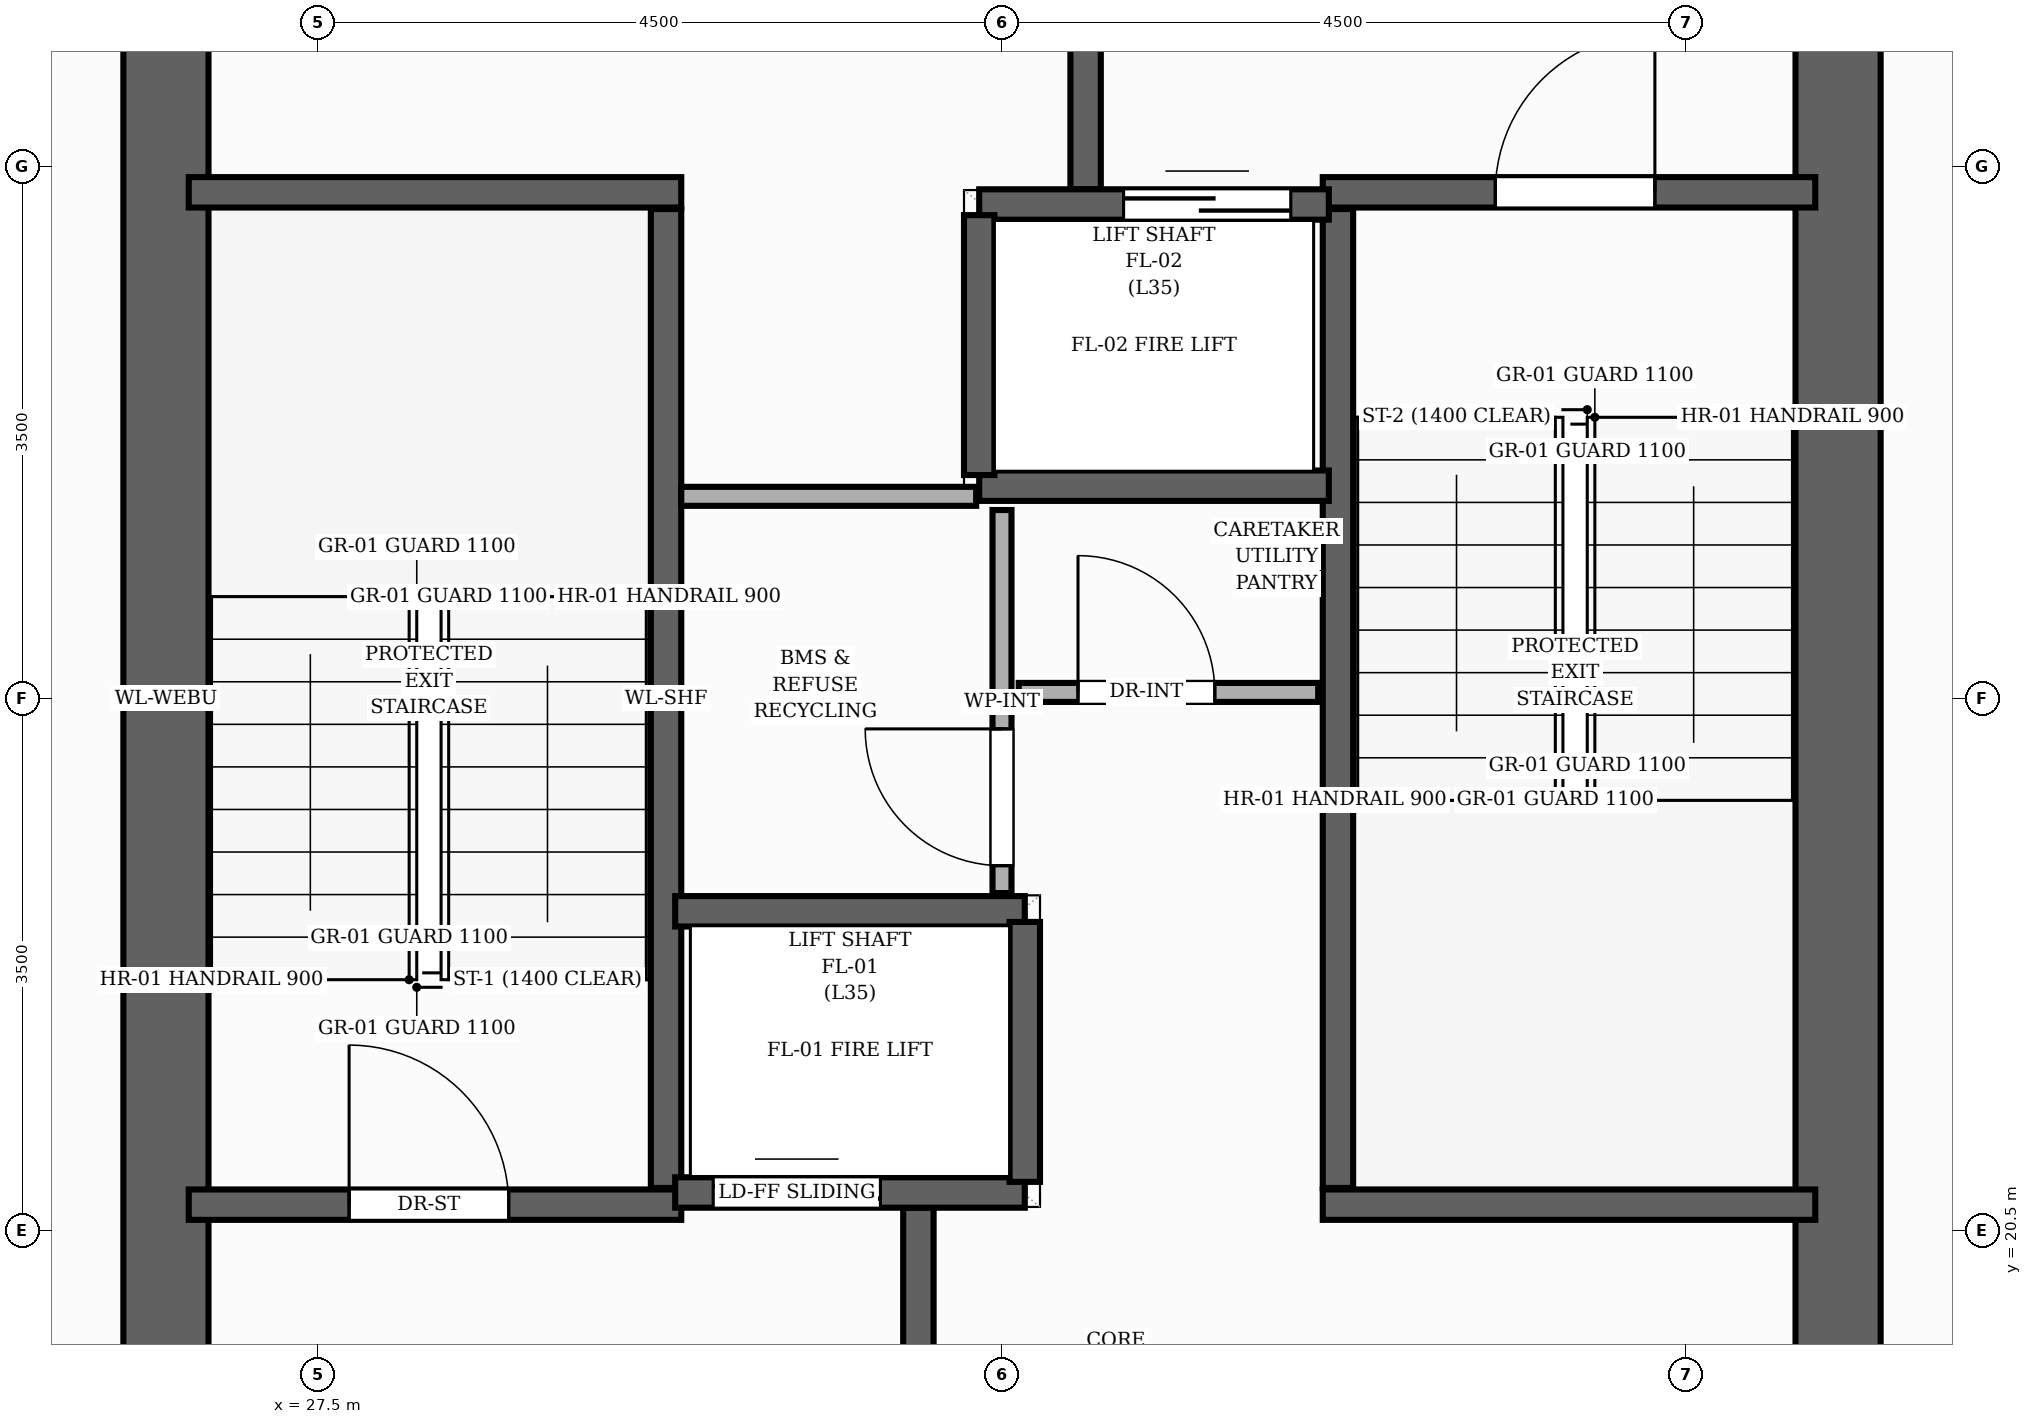
"""IFC4 building model, lengths in metres.
Left out: names, types, materials, properties, quantities, classifications, styles, units other than length and angle.
Written with IfcOpenShell. Run it as: python <this file> out.ifc"""

import sys

from ifc_helpers import new_model, si_unit, direction, frame, frame_2d, origin, place, context, subcontext, project, spatial, rectangle, extrude, element, fill, save


model = new_model("IFC4")
c1 = context("Model", 3, precision=1e-05, world=origin(), true_north=direction((0.0, 1.0)))
c2 = subcontext(c1, "Body", "Model", "MODEL_VIEW")
j1 = project(units=[si_unit("LENGTHUNIT", "METRE"), si_unit("PLANEANGLEUNIT", "RADIAN")], contexts=[c1])
p1 = place(None, origin())
s1 = spatial("IfcSite", under=j1, at=p1, CompositionType="ELEMENT")
p2 = place(p1, origin())
s2 = spatial("IfcBuilding", under=s1, at=p2, CompositionType="ELEMENT")
p3 = place(p2, frame((0.0, 0.0, 120.16)))
s3 = spatial("IfcBuildingStorey", under=s2, at=p3, CompositionType="ELEMENT", Elevation=120.16)
for number, where, z_axis, x_axis in (
    (1, (26.5, 17.3, 0.0), (0.0, 0.0, 1.0), (0.0, 1.0, 0.0)),
    (2, (37.5, 17.3, 0.0), (0.0, 0.0, 1.0), (0.0, 1.0, 0.0)),
):
    element("IfcWall", number, at=place(p3, frame(where, z_axis=z_axis, x_axis=x_axis)), inside=s3, PredefinedType="SHEAR", context=c2, shape_type="SweptSolid", body=[
        extrude(rectangle(XDim=13.4, YDim=0.56, at=frame_2d((6.7, 0.0))), origin(), (0.0, 0.0, 1.0), 3.2),
    ])
p4 = place(p3, frame((29.79, 20.78, 0.0), z_axis=(0.0, 0.0, 1.0), x_axis=(0.0, 1.0, 0.0)))
e3 = element("IfcWall", 3, at=p4, inside=s3, PredefinedType="SHEAR", context=c2, shape_type="SweptSolid", body=[
    extrude(rectangle(XDim=6.44, YDim=0.2, at=frame_2d((3.22, 0.0))), origin(), (0.0, 0.0, 1.0), 3.2),
])
p5 = place(p3, frame((26.65, 27.33, 0.0), z_axis=(0.0, 0.0, 1.0), x_axis=(1.0, 0.0, 0.0)))
e4 = element("IfcWall", 4, at=p5, inside=s3, PredefinedType="SHEAR", context=c2, shape_type="SweptSolid", body=[
    extrude(rectangle(XDim=3.24, YDim=0.2, at=frame_2d((1.62, 0.0))), origin(), (0.0, 0.0, 1.0), 3.2),
])
p6 = place(p3, frame((26.65, 20.67, 0.0), z_axis=(0.0, 0.0, 1.0), x_axis=(1.0, 0.0, 0.0)))
e5 = element("IfcWall", 5, at=p6, inside=s3, PredefinedType="SHEAR", context=c2, shape_type="SweptSolid", body=[
    extrude(rectangle(XDim=3.24, YDim=0.2, at=frame_2d((1.62, 0.0))), origin(), (0.0, 0.0, 1.0), 3.2),
])
p7 = place(p6, frame((1.055, 0.0, 0.0)))
e6 = element("IfcOpeningElement", 6, at=p7, cuts=e5, PredefinedType="OPENING", context=c2, shape_type="SweptSolid", body=[
    extrude(rectangle(XDim=1.05, YDim=2.15, at=frame_2d((0.525, 1.075))), frame((0.0, 0.11, 0.0), z_axis=(0.0, -1.0, 0.0), x_axis=(1.0, 0.0, 0.0)), (0.0, 0.0, 1.0), 0.22),
])
p8 = place(p3, frame((34.21, 20.78, 0.0), z_axis=(0.0, 0.0, 1.0), x_axis=(0.0, 1.0, 0.0)))
e7 = element("IfcWall", 7, at=p8, inside=s3, PredefinedType="SHEAR", context=c2, shape_type="SweptSolid", body=[
    extrude(rectangle(XDim=6.44, YDim=0.2, at=frame_2d((3.22, 0.0))), origin(), (0.0, 0.0, 1.0), 3.2),
])
p9 = place(p3, frame((34.11, 20.67, 0.0), z_axis=(0.0, 0.0, 1.0), x_axis=(1.0, 0.0, 0.0)))
e8 = element("IfcWall", 8, at=p9, inside=s3, PredefinedType="SHEAR", context=c2, shape_type="SweptSolid", body=[
    extrude(rectangle(XDim=3.24, YDim=0.2, at=frame_2d((1.62, 0.0))), origin(), (0.0, 0.0, 1.0), 3.2),
])
p10 = place(p3, frame((34.11, 27.33, 0.0), z_axis=(0.0, 0.0, 1.0), x_axis=(1.0, 0.0, 0.0)))
e9 = element("IfcWall", 9, at=p10, inside=s3, PredefinedType="SHEAR", context=c2, shape_type="SweptSolid", body=[
    extrude(rectangle(XDim=3.24, YDim=0.2, at=frame_2d((1.62, 0.0))), origin(), (0.0, 0.0, 1.0), 3.2),
])
p11 = place(p10, frame((1.135, 0.0, 0.0)))
e10 = element("IfcOpeningElement", 10, at=p11, cuts=e9, PredefinedType="OPENING", context=c2, shape_type="SweptSolid", body=[
    extrude(rectangle(XDim=1.05, YDim=2.15, at=frame_2d((0.525, 1.075))), frame((0.0, 0.11, 0.0), z_axis=(0.0, -1.0, 0.0), x_axis=(1.0, 0.0, 0.0)), (0.0, 0.0, 1.0), 0.22),
])
for number, where, z_axis, x_axis in (
    (11, (31.45, 17.15, 0.0), (0.0, 0.0, 1.0), (0.0, 1.0, 0.0)),
    (12, (32.55, 27.35, 0.0), (0.0, 0.0, 1.0), (0.0, 1.0, 0.0)),
):
    element("IfcWall", number, at=place(p3, frame(where, z_axis=z_axis, x_axis=x_axis)), inside=s3, PredefinedType="SHEAR", context=c2, shape_type="SweptSolid", body=[
        extrude(rectangle(XDim=3.5, YDim=0.2, at=frame_2d((1.75, 0.0))), origin(), (0.0, 0.0, 1.0), 3.2),
    ])
p12 = place(p3, frame((29.85, 20.75, 0.0), z_axis=(0.0, 0.0, 1.0), x_axis=(1.0, 0.0, 0.0)))
e13 = element("IfcWall", 13, at=p12, inside=s3, PredefinedType="SHEAR", context=c2, shape_type="SweptSolid", body=[
    extrude(rectangle(XDim=2.3, YDim=0.2, at=frame_2d((1.15, 0.0))), origin(), (0.0, 0.0, 1.0), 3.2),
])
p13 = place(p12, frame((0.25, 0.0, 0.0)))
e14 = element("IfcOpeningElement", 14, at=p13, cuts=e13, PredefinedType="OPENING", context=c2, shape_type="SweptSolid", body=[
    extrude(rectangle(XDim=1.1, YDim=2.15, at=frame_2d((0.55, 1.075))), frame((0.0, 0.11, 0.0), z_axis=(0.0, -1.0, 0.0), x_axis=(1.0, 0.0, 0.0)), (0.0, 0.0, 1.0), 0.22),
])
p14 = place(p3, frame((29.85, 22.6, 0.0), z_axis=(0.0, 0.0, 1.0), x_axis=(1.0, 0.0, 0.0)))
e15 = element("IfcWall", 15, at=p14, inside=s3, PredefinedType="SHEAR", context=c2, shape_type="SweptSolid", body=[
    extrude(rectangle(XDim=2.3, YDim=0.2, at=frame_2d((1.15, 0.0))), origin(), (0.0, 0.0, 1.0), 3.2),
])
p15 = place(p3, frame((32.15, 20.82, 0.0), z_axis=(0.0, 0.0, 1.0), x_axis=(0.0, 1.0, 0.0)))
e16 = element("IfcWall", 16, at=p15, inside=s3, PredefinedType="SHEAR", context=c2, shape_type="SweptSolid", body=[
    extrude(rectangle(XDim=1.71, YDim=0.2, at=frame_2d((0.855, 0.0))), origin(), (0.0, 0.0, 1.0), 3.2),
])
p16 = place(p3, frame((31.85, 27.25, 0.0), z_axis=(0.0, 0.0, 1.0), x_axis=(1.0, 0.0, 0.0)))
e17 = element("IfcWall", 17, at=p16, inside=s3, PredefinedType="SHEAR", context=c2, shape_type="SweptSolid", body=[
    extrude(rectangle(XDim=2.3, YDim=0.2, at=frame_2d((1.15, 0.0))), origin(), (0.0, 0.0, 1.0), 3.2),
])
p17 = place(p16, frame((0.95, 0.0, 0.0)))
e18 = element("IfcOpeningElement", 18, at=p17, cuts=e17, PredefinedType="OPENING", context=c2, shape_type="SweptSolid", body=[
    extrude(rectangle(XDim=1.1, YDim=2.15, at=frame_2d((0.55, 1.075))), frame((0.0, 0.11, 0.0), z_axis=(0.0, -1.0, 0.0), x_axis=(1.0, 0.0, 0.0)), (0.0, 0.0, 1.0), 0.22),
])
p18 = place(p3, frame((31.85, 25.4, 0.0), z_axis=(0.0, 0.0, 1.0), x_axis=(1.0, 0.0, 0.0)))
e19 = element("IfcWall", 19, at=p18, inside=s3, PredefinedType="SHEAR", context=c2, shape_type="SweptSolid", body=[
    extrude(rectangle(XDim=2.3, YDim=0.2, at=frame_2d((1.15, 0.0))), origin(), (0.0, 0.0, 1.0), 3.2),
])
p19 = place(p3, frame((31.85, 25.47, 0.0), z_axis=(0.0, 0.0, 1.0), x_axis=(0.0, 1.0, 0.0)))
e20 = element("IfcWall", 20, at=p19, inside=s3, PredefinedType="SHEAR", context=c2, shape_type="SweptSolid", body=[
    extrude(rectangle(XDim=1.71, YDim=0.2, at=frame_2d((0.855, 0.0))), origin(), (0.0, 0.0, 1.0), 3.2),
])
p20 = place(p3, frame((32.0, 22.72, 0.0), z_axis=(0.0, 0.0, 1.0), x_axis=(0.0, 1.0, 0.0)))
e21 = element("IfcWall", 21, at=p20, inside=s3, PredefinedType="PARTITIONING", context=c2, shape_type="SweptSolid", body=[
    extrude(rectangle(XDim=2.52, YDim=0.125, at=frame_2d((1.26, 0.0))), origin(), (0.0, 0.0, 1.0), 2.955),
])
p21 = place(p20, frame((0.18, 0.0, 0.0)))
e22 = element("IfcOpeningElement", 22, at=p21, cuts=e21, PredefinedType="OPENING", context=c2, shape_type="SweptSolid", body=[
    extrude(rectangle(XDim=0.9, YDim=2.1, at=frame_2d((0.45, 1.05))), frame((0.0, 0.073, 0.0), z_axis=(0.0, -1.0, 0.0), x_axis=(1.0, 0.0, 0.0)), (0.0, 0.0, 1.0), 0.145),
])
p22 = place(p3, frame((32.11, 24.04, 0.0), z_axis=(0.0, 0.0, 1.0), x_axis=(1.0, 0.0, 0.0)))
e23 = element("IfcWall", 23, at=p22, inside=s3, PredefinedType="PARTITIONING", context=c2, shape_type="SweptSolid", body=[
    extrude(rectangle(XDim=1.97, YDim=0.125, at=frame_2d((0.985, 0.0))), origin(), (0.0, 0.0, 1.0), 2.955),
])
p23 = place(p22, frame((0.39, 0.0, 0.0)))
e24 = element("IfcOpeningElement", 24, at=p23, cuts=e23, PredefinedType="OPENING", context=c2, shape_type="SweptSolid", body=[
    extrude(rectangle(XDim=0.9, YDim=2.1, at=frame_2d((0.45, 1.05))), frame((0.0, 0.073, 0.0), z_axis=(0.0, -1.0, 0.0), x_axis=(1.0, 0.0, 0.0)), (0.0, 0.0, 1.0), 0.145),
])
p24 = place(p3, frame((29.89, 25.33, 0.0), z_axis=(0.0, 0.0, 1.0), x_axis=(1.0, 0.0, 0.0)))
e25 = element("IfcWall", 25, at=p24, inside=s3, PredefinedType="PARTITIONING", context=c2, shape_type="SweptSolid", body=[
    extrude(rectangle(XDim=1.94, YDim=0.125, at=frame_2d((0.97, 0.0))), origin(), (0.0, 0.0, 1.0), 2.955),
])
p25 = place(p7, origin())
e26 = element("IfcDoor", 26, at=p25, inside=s3, OperationType="SINGLE_SWING_LEFT", PredefinedType="DOOR", context=c2, shape_type="SweptSolid", body=[
    extrude(rectangle(XDim=1.05, YDim=2.15, at=frame_2d((0.525, 1.075))), frame((0.0, 0.025, 0.0), z_axis=(0.0, -1.0, 0.0), x_axis=(1.0, 0.0, 0.0)), (0.0, 0.0, 1.0), 0.05),
])
fill(e6, e26)
p26 = place(p11, origin())
e27 = element("IfcDoor", 27, at=p26, inside=s3, OperationType="SINGLE_SWING_RIGHT", PredefinedType="DOOR", context=c2, shape_type="SweptSolid", body=[
    extrude(rectangle(XDim=1.05, YDim=2.15, at=frame_2d((0.525, 1.075))), frame((0.0, 0.025, 0.0), z_axis=(0.0, -1.0, 0.0), x_axis=(1.0, 0.0, 0.0)), (0.0, 0.0, 1.0), 0.05),
])
fill(e10, e27)
p27 = place(p13, origin())
e28 = element("IfcDoor", 28, at=p27, inside=s3, OperationType="DOUBLE_DOOR_SLIDING", PredefinedType="DOOR", context=c2, shape_type="SweptSolid", body=[
    extrude(rectangle(XDim=1.1, YDim=2.15, at=frame_2d((0.55, 1.075))), frame((0.0, 0.025, 0.0), z_axis=(0.0, -1.0, 0.0), x_axis=(1.0, 0.0, 0.0)), (0.0, 0.0, 1.0), 0.05),
])
fill(e14, e28)
p28 = place(p17, origin())
e29 = element("IfcDoor", 29, at=p28, inside=s3, OperationType="DOUBLE_DOOR_SLIDING", PredefinedType="DOOR", context=c2, shape_type="SweptSolid", body=[
    extrude(rectangle(XDim=1.1, YDim=2.15, at=frame_2d((0.55, 1.075))), frame((0.0, 0.025, 0.0), z_axis=(0.0, -1.0, 0.0), x_axis=(1.0, 0.0, 0.0)), (0.0, 0.0, 1.0), 0.05),
])
fill(e18, e29)
p29 = place(p23, origin())
e30 = element("IfcDoor", 30, at=p29, inside=s3, OperationType="SINGLE_SWING_LEFT", PredefinedType="DOOR", context=c2, shape_type="SweptSolid", body=[
    extrude(rectangle(XDim=0.9, YDim=2.1, at=frame_2d((0.45, 1.05))), frame((0.0, 0.025, 0.0), z_axis=(0.0, -1.0, 0.0), x_axis=(1.0, 0.0, 0.0)), (0.0, 0.0, 1.0), 0.05),
])
fill(e24, e30)
p30 = place(p21, origin())
e31 = element("IfcDoor", 31, at=p30, inside=s3, OperationType="SINGLE_SWING_RIGHT", PredefinedType="DOOR", context=c2, shape_type="SweptSolid", body=[
    extrude(rectangle(XDim=0.9, YDim=2.1, at=frame_2d((0.45, 1.05))), frame((0.0, 0.025, 0.0), z_axis=(0.0, -1.0, 0.0), x_axis=(1.0, 0.0, 0.0)), (0.0, 0.0, 1.0), 0.05),
])
fill(e22, e31)
save(model, sys.argv[1])
